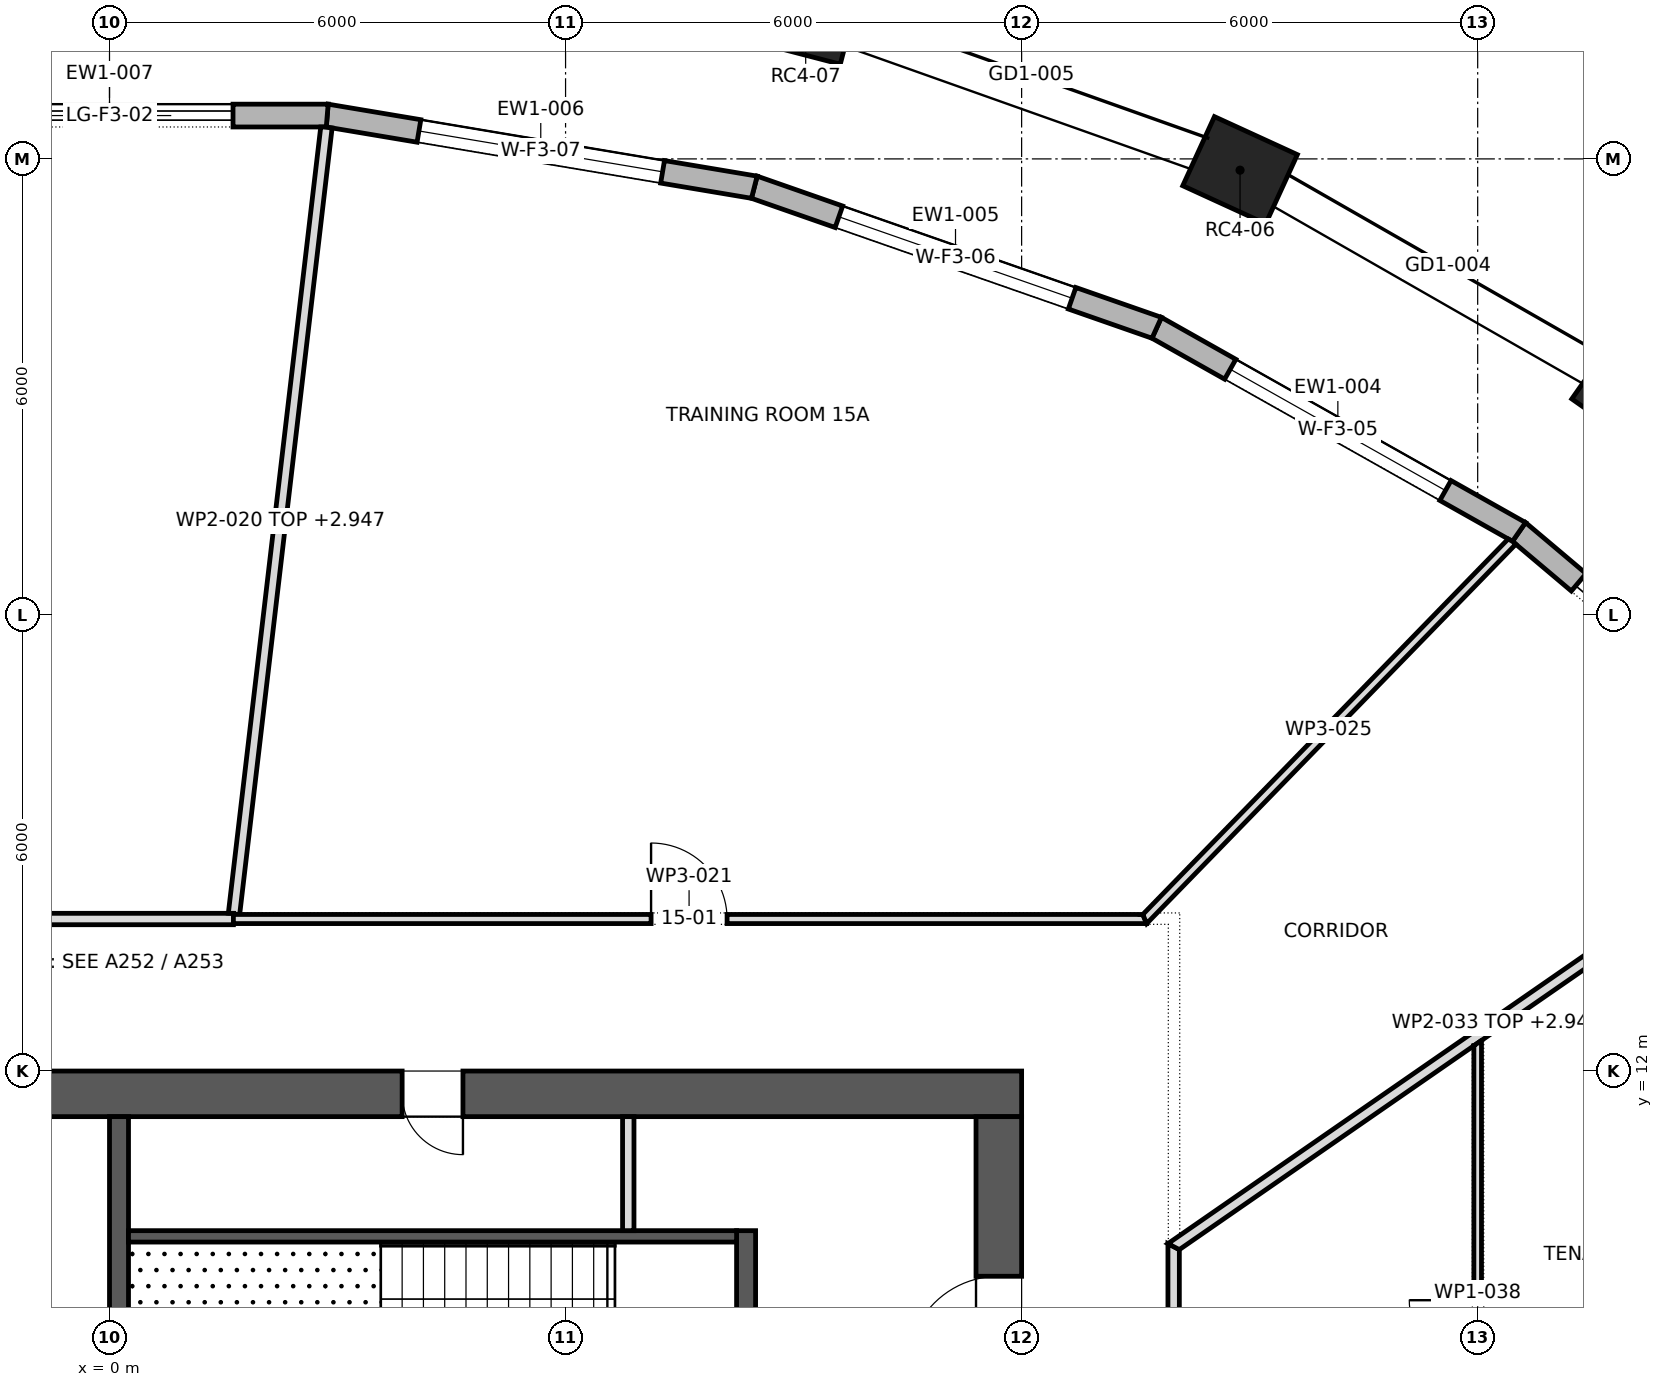
"""IFC4 building model, lengths in metres.
Left out: names, types, materials, properties, quantities, classifications, styles, units other than length and angle.
Written with IfcOpenShell. Run it as: python <this file> out.ifc"""

import sys

from ifc_helpers import new_model, si_unit, direction, frame, frame_2d, origin, origin_2d, place, context, subcontext, project, spatial, polyline, rectangle, outline, extrude, element, fill, save


model = new_model("IFC4")
c1 = context("Model", 3, precision=1e-05, world=origin(), true_north=direction((0.0, 1.0)))
c2 = subcontext(c1, "Body", "Model", "MODEL_VIEW")
j1 = project(units=[si_unit("LENGTHUNIT", "METRE"), si_unit("PLANEANGLEUNIT", "RADIAN")], contexts=[c1])
p1 = place(None, origin())
s1 = spatial("IfcSite", under=j1, at=p1, CompositionType="ELEMENT")
p2 = place(p1, origin())
s2 = spatial("IfcBuilding", under=s1, at=p2, CompositionType="ELEMENT")
p3 = place(p2, frame((0.0, 0.0, 222.9)))
s3 = spatial("IfcBuildingStorey", under=s2, at=p3, CompositionType="ELEMENT", Elevation=222.9)
for number, where, z_axis, x_axis in (
    (1, (20.017, 20.906, 0.0), (0.0, 0.0, 1.0), (-0.818, 0.575, 0.0)),
    (2, (14.874, 23.852, 0.0), (0.0, 0.0, 1.0), (-0.909, 0.417, 0.0)),
    (3, (9.159, 25.881, 0.0), (0.0, 0.0, 1.0), (-0.968, 0.252, 0.0)),
):
    element("IfcColumn", number, at=place(p3, frame(where, z_axis=z_axis, x_axis=x_axis)), inside=s3, PredefinedType="COLUMN", context=c2, shape_type="SweptSolid", body=[
        extrude(rectangle(XDim=1.2, YDim=1.0, at=origin_2d()), origin(), (0.0, 0.0, 1.0), 4.0),
    ])
p4 = place(p3, frame((-12.0, 11.7, 0.0), z_axis=(0.0, 0.0, 1.0), x_axis=(1.0, 0.0, 0.0)))
e4 = element("IfcWall", 4, at=p4, inside=s3, PredefinedType="SHEAR", context=c2, shape_type="SweptSolid", body=[
    extrude(rectangle(XDim=24.0, YDim=0.6, at=frame_2d((12.0, 0.0))), origin(), (0.0, 0.0, 1.0), 4.0),
])
p5 = place(p4, frame((9.975, 0.0, 0.0)))
e5 = element("IfcOpeningElement", 5, at=p5, cuts=e4, PredefinedType="OPENING", context=c2, shape_type="SweptSolid", body=[
    extrude(rectangle(XDim=0.9, YDim=2.1, at=frame_2d((0.45, 1.05))), frame((0.0, 0.312, 0.0), z_axis=(0.0, -1.0, 0.0), x_axis=(1.0, 0.0, 0.0)), (0.0, 0.0, 1.0), 0.624),
])
p6 = place(p4, frame((3.6, 0.0, 0.0)))
e6 = element("IfcOpeningElement", 6, at=p6, cuts=e4, PredefinedType="OPENING", context=c2, shape_type="SweptSolid", body=[
    extrude(rectangle(XDim=0.8, YDim=2.1, at=frame_2d((0.4, 1.05))), frame((0.0, 0.312, 0.0), z_axis=(0.0, -1.0, 0.0), x_axis=(1.0, 0.0, 0.0)), (0.0, 0.0, 1.0), 0.624),
])
p7 = place(p4, frame((6.2, 0.0, 0.0)))
e7 = element("IfcOpeningElement", 7, at=p7, cuts=e4, PredefinedType="OPENING", context=c2, shape_type="SweptSolid", body=[
    extrude(rectangle(XDim=0.8, YDim=2.1, at=frame_2d((0.4, 1.05))), frame((0.0, 0.312, 0.0), z_axis=(0.0, -1.0, 0.0), x_axis=(1.0, 0.0, 0.0)), (0.0, 0.0, 1.0), 0.624),
])
p8 = place(p4, frame((15.85, 0.0, 0.0)))
e8 = element("IfcOpeningElement", 8, at=p8, cuts=e4, PredefinedType="OPENING", context=c2, shape_type="SweptSolid", body=[
    extrude(rectangle(XDim=0.8, YDim=2.1, at=frame_2d((0.4, 1.05))), frame((0.0, 0.312, 0.0), z_axis=(0.0, -1.0, 0.0), x_axis=(1.0, 0.0, 0.0)), (0.0, 0.0, 1.0), 0.624),
])
p9 = place(p3, frame((11.7, -11.4, 0.0), z_axis=(0.0, 0.0, 1.0), x_axis=(0.0, 1.0, 0.0)))
e9 = element("IfcWall", 9, at=p9, inside=s3, PredefinedType="SHEAR", context=c2, shape_type="SweptSolid", body=[
    extrude(rectangle(XDim=22.8, YDim=0.6, at=frame_2d((11.4, 0.0))), origin(), (0.0, 0.0, 1.0), 4.0),
])
p10 = place(p9, frame((10.2, 0.0, 0.0)))
e10 = element("IfcOpeningElement", 10, at=p10, cuts=e9, PredefinedType="OPENING", context=c2, shape_type="SweptSolid", body=[
    extrude(rectangle(XDim=2.4, YDim=2.1, at=frame_2d((1.2, 1.05))), frame((0.0, 0.312, 0.0), z_axis=(0.0, -1.0, 0.0), x_axis=(1.0, 0.0, 0.0)), (0.0, 0.0, 1.0), 0.624),
])
p11 = place(p9, frame((19.5, 0.0, 0.0)))
e11 = element("IfcOpeningElement", 11, at=p11, cuts=e9, PredefinedType="OPENING", context=c2, shape_type="SweptSolid", body=[
    extrude(rectangle(XDim=1.2, YDim=2.1, at=frame_2d((0.6, 1.05))), frame((0.0, 0.312, 0.0), z_axis=(0.0, -1.0, 0.0), x_axis=(1.0, 0.0, 0.0)), (0.0, 0.0, 1.0), 0.624),
])
p12 = place(p9, frame((2.1, 0.0, 0.0)))
e12 = element("IfcOpeningElement", 12, at=p12, cuts=e9, PredefinedType="OPENING", context=c2, shape_type="SweptSolid", body=[
    extrude(rectangle(XDim=1.2, YDim=2.1, at=frame_2d((0.6, 1.05))), frame((0.0, 0.312, 0.0), z_axis=(0.0, -1.0, 0.0), x_axis=(1.0, 0.0, 0.0)), (0.0, 0.0, 1.0), 0.624),
])
p13 = place(p3, frame((22.599, 15.672, 0.0), z_axis=(0.0, 0.0, 1.0), x_axis=(-0.764397795062, 0.644744919255, 0.0)))
e13 = element("IfcWall", 13, at=p13, inside=s3, PredefinedType="STANDARD", context=c2, shape_type="SweptSolid", body=[
    extrude(outline(polyline([(-0.015, -0.15), (5.319, -0.15), (5.291, 0.15), (0.015, 0.15), (-0.015, -0.15)])), origin(), (0.0, 0.0, 1.0), 3.7),
])
p14 = place(p13, frame((1.028, 0.0, 0.0)))
e14 = element("IfcOpeningElement", 14, at=p14, cuts=e13, PredefinedType="OPENING", context=c2, shape_type="SweptSolid", body=[
    extrude(rectangle(XDim=3.25, YDim=3.25, at=frame_2d((1.625, 1.625))), frame((0.0, 0.162, 0.0), z_axis=(0.0, -1.0, 0.0), x_axis=(1.0, 0.0, 0.0)), (0.0, 0.0, 1.0), 0.324),
])
p15 = place(p3, frame((18.543, 19.092, 0.0), z_axis=(0.0, 0.0, 1.0), x_axis=(-0.871207038577, 0.490915772749, 0.0)))
e15 = element("IfcWall", 15, at=p15, inside=s3, PredefinedType="STANDARD", context=c2, shape_type="SweptSolid", body=[
    extrude(outline(polyline([(-0.014, -0.15), (5.484, -0.15), (5.458, 0.15), (0.014, 0.15), (-0.014, -0.15)])), origin(), (0.0, 0.0, 1.0), 3.7),
])
p16 = place(p15, frame((1.111, 0.0, 0.6)))
e16 = element("IfcOpeningElement", 16, at=p16, cuts=e15, PredefinedType="OPENING", context=c2, shape_type="SweptSolid", body=[
    extrude(rectangle(XDim=3.25, YDim=2.65, at=frame_2d((1.625, 1.325))), frame((0.0, 0.162, 0.0), z_axis=(0.0, -1.0, 0.0), x_axis=(1.0, 0.0, 0.0)), (0.0, 0.0, 1.0), 0.324),
])
p17 = place(p3, frame((13.777, 21.778, 0.0), z_axis=(0.0, 0.0, 1.0), x_axis=(-0.944053670735, 0.329791853708, 0.0)))
e17 = element("IfcWall", 17, at=p17, inside=s3, PredefinedType="STANDARD", context=c2, shape_type="SweptSolid", body=[
    extrude(outline(polyline([(-0.013, -0.15), (5.62, -0.15), (5.595, 0.15), (0.013, 0.15), (-0.013, -0.15)])), origin(), (0.0, 0.0, 1.0), 3.7),
])
p18 = place(p17, frame((1.179, 0.0, 0.6)))
e18 = element("IfcOpeningElement", 18, at=p18, cuts=e17, PredefinedType="OPENING", context=c2, shape_type="SweptSolid", body=[
    extrude(rectangle(XDim=3.25, YDim=2.65, at=frame_2d((1.625, 1.325))), frame((0.0, 0.162, 0.0), z_axis=(0.0, -1.0, 0.0), x_axis=(1.0, 0.0, 0.0)), (0.0, 0.0, 1.0), 0.324),
])
p19 = place(p3, frame((8.483, 23.627, 0.0), z_axis=(0.0, 0.0, 1.0), x_axis=(-0.986218486863, 0.16544816762, 0.0)))
e19 = element("IfcWall", 19, at=p19, inside=s3, PredefinedType="STANDARD", context=c2, shape_type="SweptSolid", body=[
    extrude(outline(polyline([(-0.013, -0.15), (5.71, -0.15), (5.685, 0.15), (0.013, 0.15), (-0.013, -0.15)])), origin(), (0.0, 0.0, 1.0), 3.7),
])
p20 = place(p19, frame((1.224, 0.0, 0.6)))
e20 = element("IfcOpeningElement", 20, at=p20, cuts=e19, PredefinedType="OPENING", context=c2, shape_type="SweptSolid", body=[
    extrude(rectangle(XDim=3.25, YDim=2.65, at=frame_2d((1.625, 1.325))), frame((0.0, 0.162, 0.0), z_axis=(0.0, -1.0, 0.0), x_axis=(1.0, 0.0, 0.0)), (0.0, 0.0, 1.0), 0.324),
])
p21 = place(p3, frame((2.864, 24.57, 0.0), z_axis=(0.0, 0.0, 1.0), x_axis=(-1.0, 0.0, 0.0)))
e21 = element("IfcWall", 21, at=p21, inside=s3, PredefinedType="STANDARD", context=c2, shape_type="SweptSolid", body=[
    extrude(outline(polyline([(-0.012, -0.15), (5.741, -0.15), (5.716, 0.15), (0.012, 0.15), (-0.012, -0.15)])), origin(), (0.0, 0.0, 1.0), 3.7),
])
p22 = place(p21, frame((1.239, 0.0, 0.0)))
e22 = element("IfcOpeningElement", 22, at=p22, cuts=e21, PredefinedType="OPENING", context=c2, shape_type="SweptSolid", body=[
    extrude(rectangle(XDim=3.25, YDim=3.25, at=frame_2d((1.625, 1.625))), frame((0.0, 0.162, 0.0), z_axis=(0.0, -1.0, 0.0), x_axis=(1.0, 0.0, 0.0)), (0.0, 0.0, 1.0), 0.324),
])
p23 = place(p3, frame((0.125, 6.5, 0.0), z_axis=(0.0, 0.0, 1.0), x_axis=(0.0, 1.0, 0.0)))
e23 = element("IfcWall", 23, at=p23, inside=s3, PredefinedType="SHEAR", context=c2, shape_type="SweptSolid", body=[
    extrude(rectangle(XDim=4.9, YDim=0.25, at=frame_2d((2.45, 0.0))), origin(), (0.0, 0.0, 1.0), 3.7),
])
p24 = place(p3, frame((8.375, 6.5, 0.0), z_axis=(0.0, 0.0, 1.0), x_axis=(0.0, 1.0, 0.0)))
e24 = element("IfcWall", 24, at=p24, inside=s3, PredefinedType="SHEAR", context=c2, shape_type="SweptSolid", body=[
    extrude(rectangle(XDim=3.4, YDim=0.25, at=frame_2d((1.7, 0.0))), origin(), (0.0, 0.0, 1.0), 3.7),
])
p25 = place(p24, frame((1.025, 0.0, 0.0)))
e25 = element("IfcOpeningElement", 25, at=p25, cuts=e24, PredefinedType="OPENING", context=c2, shape_type="SweptSolid", body=[
    extrude(rectangle(XDim=1.2, YDim=2.1, at=frame_2d((0.6, 1.05))), frame((0.0, 0.137, 0.0), z_axis=(0.0, -1.0, 0.0), x_axis=(1.0, 0.0, 0.0)), (0.0, 0.0, 1.0), 0.274),
])
p26 = place(p3, frame((0.25, 9.825, 0.0), z_axis=(0.0, 0.0, 1.0), x_axis=(1.0, 0.0, 0.0)))
e26 = element("IfcWall", 26, at=p26, inside=s3, PredefinedType="SHEAR", context=c2, shape_type="SweptSolid", body=[
    extrude(rectangle(XDim=8.0, YDim=0.15, at=frame_2d((4.0, 0.0))), origin(), (0.0, 0.0, 1.0), 3.7),
])
p27 = place(p3, frame((6.825, 9.9, 0.0), z_axis=(0.0, 0.0, 1.0), x_axis=(0.0, 1.0, 0.0)))
e27 = element("IfcWall", 27, at=p27, inside=s3, PredefinedType="PARTITIONING", context=c2, shape_type="SweptSolid", body=[
    extrude(rectangle(XDim=1.5, YDim=0.15, at=frame_2d((0.75, 0.0))), origin(), (0.0, 0.0, 1.0), 3.7),
])
p28 = place(p3, frame((-14.075, 14.0, 0.0), z_axis=(0.0, 0.0, 1.0), x_axis=(1.0, 0.0, 0.0)))
e28 = element("IfcWall", 28, at=p28, inside=s3, PredefinedType="PARTITIONING", context=c2, shape_type="SweptSolid", body=[
    extrude(outline(polyline([(15.705, 0.075), (13.742, 0.075), (11.779, 0.075), (9.815, 0.075), (7.853, 0.075), (5.889, 0.075), (3.926, 0.075), (1.963, 0.075), (0.0, 0.075), (0.15, -0.075), (2.094, -0.075), (4.039, -0.075), (5.983, -0.075), (7.927, -0.075), (9.872, -0.075), (11.816, -0.075), (13.76, -0.075), (15.705, -0.075), (15.705, 0.075)])), origin(), (0.0, 0.0, 1.0), 3.7),
])
p29 = place(p28, frame((9.955, 0.0, 0.0)))
e29 = element("IfcOpeningElement", 29, at=p29, cuts=e28, PredefinedType="OPENING", context=c2, shape_type="SweptSolid", body=[
    extrude(rectangle(XDim=1.0, YDim=2.1, at=frame_2d((0.5, 1.05))), frame((0.0, 0.087, 0.0), z_axis=(0.0, -1.0, 0.0), x_axis=(1.0, 0.0, 0.0)), (0.0, 0.0, 1.0), 0.174),
])
p30 = place(p28, frame((2.14, 0.0, 0.0)))
e30 = element("IfcOpeningElement", 30, at=p30, cuts=e28, PredefinedType="OPENING", context=c2, shape_type="SweptSolid", body=[
    extrude(rectangle(XDim=1.0, YDim=2.1, at=frame_2d((0.5, 1.05))), frame((0.0, 0.087, 0.0), z_axis=(0.0, -1.0, 0.0), x_axis=(1.0, 0.0, 0.0)), (0.0, 0.0, 1.0), 0.174),
])
p31 = place(p3, frame((1.638, 14.066, 0.0), z_axis=(0.0, 0.0, 1.0), x_axis=(0.116747450487, 0.993161634783, 0.0)))
e31 = element("IfcWall", 31, at=p31, inside=s3, PredefinedType="PARTITIONING", context=c2, shape_type="SweptSolid", body=[
    extrude(outline(polyline([(10.42, -0.075), (10.42, 0.039), (10.416, 0.075), (8.68, 0.075), (6.944, 0.075), (5.208, 0.075), (3.472, 0.075), (1.736, 0.075), (0.0, 0.075), (0.0, 0.074), (0.008, 0.009), (0.0, 0.008), (0.0, -0.055), (0.002, -0.075), (1.739, -0.075), (3.475, -0.075), (5.211, -0.075), (6.948, -0.075), (8.684, -0.075), (10.42, -0.075)])), origin(), (0.0, 0.0, 1.0), 2.947),
])
p32 = place(p3, frame((1.63, 14.0, 0.0), z_axis=(0.0, 0.0, 1.0), x_axis=(1.0, 0.0, 0.0)))
e32 = element("IfcWall", 32, at=p32, inside=s3, PredefinedType="PARTITIONING", context=c2, shape_type="SweptSolid", body=[
    extrude(outline(polyline([(12.015, -0.06), (12.015, -0.06), (11.965, 0.06), (9.971, 0.06), (7.977, 0.06), (5.982, 0.06), (3.988, 0.06), (1.994, 0.06), (0.0, 0.06), (0.0, -0.06), (1.717, -0.06), (3.433, -0.06), (5.149, -0.06), (6.866, -0.06), (8.583, -0.06), (10.299, -0.06), (12.015, -0.06)])), origin(), (0.0, 0.0, 1.0), 3.7),
])
p33 = place(p32, frame((5.495, 0.0, 0.0)))
e33 = element("IfcOpeningElement", 33, at=p33, cuts=e32, PredefinedType="OPENING", context=c2, shape_type="SweptSolid", body=[
    extrude(rectangle(XDim=1.0, YDim=2.1, at=frame_2d((0.5, 1.05))), frame((0.0, 0.072, 0.0), z_axis=(0.0, -1.0, 0.0), x_axis=(1.0, 0.0, 0.0)), (0.0, 0.0, 1.0), 0.144),
])
p34 = place(p3, frame((13.602, 13.982, 0.0), z_axis=(0.0, 0.0, 1.0), x_axis=(0.697346685185, 0.716733981797, 0.0)))
e34 = element("IfcWall", 34, at=p34, inside=s3, PredefinedType="PARTITIONING", context=c2, shape_type="SweptSolid", body=[
    extrude(outline(polyline([(6.964, -0.06), (6.964, -0.058), (6.96, -0.002), (6.943, 0.06), (5.22, 0.06), (3.497, 0.06), (1.774, 0.06), (0.051, 0.06), (0.051, 0.06), (0.025, 0.0), (0.0, -0.06), (1.741, -0.06), (3.482, -0.06), (5.223, -0.06), (6.964, -0.06)])), origin(), (0.0, 0.0, 1.0), 3.7),
])
p35 = place(p3, frame((14.0, -0.26, 0.0), z_axis=(0.0, 0.0, 1.0), x_axis=(0.0, 1.0, 0.0)))
e35 = element("IfcWall", 35, at=p35, inside=s3, PredefinedType="PARTITIONING", context=c2, shape_type="SweptSolid", body=[
    extrude(outline(polyline([(0.0, -0.075), (1.982, -0.075), (3.964, -0.075), (5.947, -0.075), (7.929, -0.075), (9.911, -0.075), (9.989, 0.075), (9.989, 0.075), (7.991, 0.075), (5.994, 0.075), (3.996, 0.075), (1.998, 0.075), (0.0, 0.075), (0.0, -0.075)])), origin(), (0.0, 0.0, 1.0), 3.7),
])
p36 = place(p35, frame((1.42, 0.0, 0.0)))
e36 = element("IfcOpeningElement", 36, at=p36, cuts=e35, PredefinedType="OPENING", context=c2, shape_type="SweptSolid", body=[
    extrude(rectangle(XDim=1.0, YDim=2.1, at=frame_2d((0.5, 1.05))), frame((0.0, 0.087, 0.0), z_axis=(0.0, -1.0, 0.0), x_axis=(1.0, 0.0, 0.0)), (0.0, 0.0, 1.0), 0.174),
])
p37 = place(p35, frame((6.395, 0.0, 0.0)))
e37 = element("IfcOpeningElement", 37, at=p37, cuts=e35, PredefinedType="OPENING", context=c2, shape_type="SweptSolid", body=[
    extrude(rectangle(XDim=1.0, YDim=2.1, at=frame_2d((0.5, 1.05))), frame((0.0, 0.087, 0.0), z_axis=(0.0, -1.0, 0.0), x_axis=(1.0, 0.0, 0.0)), (0.0, 0.0, 1.0), 0.174),
])
p38 = place(p3, frame((13.968, 9.667, 0.0), z_axis=(0.0, 0.0, 1.0), x_axis=(0.822219313141, 0.56917080134, 0.0)))
e38 = element("IfcWall", 38, at=p38, inside=s3, PredefinedType="PARTITIONING", context=c2, shape_type="SweptSolid", body=[
    extrude(outline(polyline([(0.079, -0.075), (1.65, -0.075), (3.22, -0.075), (4.791, -0.075), (4.792, -0.073), (4.795, -0.075), (6.653, -0.075), (8.511, -0.075), (10.37, -0.075), (10.37, -0.066), (10.365, -0.0), (10.345, 0.075), (8.621, 0.075), (6.897, 0.075), (5.173, 0.075), (3.448, 0.075), (1.724, 0.075), (0.0, 0.075), (0.039, 0.0), (0.079, -0.075)])), origin(), (0.0, 0.0, 1.0), 2.947),
])
p39 = place(p3, frame((18.0, 12.402, 0.0), z_axis=(0.0, 0.0, 1.0), x_axis=(0.0, -1.0, 0.0)))
e39 = element("IfcWall", 39, at=p39, inside=s3, PredefinedType="PARTITIONING", context=c2, shape_type="SweptSolid", body=[
    extrude(outline(polyline([(7.727, -0.05), (7.727, -0.048), (7.702, 0.05), (5.776, 0.05), (3.851, 0.05), (1.926, 0.05), (0.0, 0.05), (0.0, 0.05), (0.069, -0.05), (1.984, -0.05), (3.898, -0.05), (5.812, -0.05), (7.727, -0.05)])), origin(), (0.0, 0.0, 1.0), 3.7),
])
p40 = place(p39, frame((3.417, 0.0, 0.0)))
e40 = element("IfcOpeningElement", 40, at=p40, cuts=e39, PredefinedType="OPENING", context=c2, shape_type="SweptSolid", body=[
    extrude(rectangle(XDim=0.9, YDim=2.1, at=frame_2d((0.45, 1.05))), frame((0.0, 0.062, 0.0), z_axis=(0.0, -1.0, 0.0), x_axis=(1.0, 0.0, 0.0)), (0.0, 0.0, 1.0), 0.124),
])
p41 = place(p14, origin())
e41 = element("IfcDoor", 41, at=p41, inside=s3, OperationType="DOUBLE_DOOR_SLIDING", PredefinedType="DOOR", context=c2, shape_type="SweptSolid", body=[
    extrude(rectangle(XDim=3.25, YDim=3.25, at=frame_2d((1.625, 1.625))), frame((0.0, 0.025, 0.0), z_axis=(0.0, -1.0, 0.0), x_axis=(1.0, 0.0, 0.0)), (0.0, 0.0, 1.0), 0.05),
])
fill(e14, e41)
p42 = place(p16, origin())
e42 = element("IfcWindow", 42, at=p42, inside=s3, PartitioningType="TRIPLE_PANEL_VERTICAL", PredefinedType="WINDOW", context=c2, shape_type="SweptSolid", body=[
    extrude(rectangle(XDim=3.25, YDim=2.65, at=frame_2d((1.625, 1.325))), frame((0.0, 0.03, 0.0), z_axis=(0.0, -1.0, 0.0), x_axis=(1.0, 0.0, 0.0)), (0.0, 0.0, 1.0), 0.06),
])
fill(e16, e42)
p43 = place(p18, origin())
e43 = element("IfcWindow", 43, at=p43, inside=s3, PartitioningType="TRIPLE_PANEL_VERTICAL", PredefinedType="WINDOW", context=c2, shape_type="SweptSolid", body=[
    extrude(rectangle(XDim=3.25, YDim=2.65, at=frame_2d((1.625, 1.325))), frame((0.0, 0.03, 0.0), z_axis=(0.0, -1.0, 0.0), x_axis=(1.0, 0.0, 0.0)), (0.0, 0.0, 1.0), 0.06),
])
fill(e18, e43)
p44 = place(p20, origin())
e44 = element("IfcWindow", 44, at=p44, inside=s3, PartitioningType="TRIPLE_PANEL_VERTICAL", PredefinedType="WINDOW", context=c2, shape_type="SweptSolid", body=[
    extrude(rectangle(XDim=3.25, YDim=2.65, at=frame_2d((1.625, 1.325))), frame((0.0, 0.03, 0.0), z_axis=(0.0, -1.0, 0.0), x_axis=(1.0, 0.0, 0.0)), (0.0, 0.0, 1.0), 0.06),
])
fill(e20, e44)
p45 = place(p22, origin())
e45 = element("IfcDoor", 45, at=p45, inside=s3, OperationType="DOUBLE_DOOR_SLIDING", PredefinedType="DOOR", context=c2, shape_type="SweptSolid", body=[
    extrude(rectangle(XDim=3.25, YDim=3.25, at=frame_2d((1.625, 1.625))), frame((0.0, 0.025, 0.0), z_axis=(0.0, -1.0, 0.0), x_axis=(1.0, 0.0, 0.0)), (0.0, 0.0, 1.0), 0.05),
])
fill(e22, e45)
p46 = place(p11, origin())
e46 = element("IfcDoor", 46, at=p46, inside=s3, OperationType="SINGLE_SWING_RIGHT", PredefinedType="DOOR", context=c2, shape_type="SweptSolid", body=[
    extrude(rectangle(XDim=1.2, YDim=2.1, at=frame_2d((0.6, 1.05))), frame((0.0, 0.025, 0.0), z_axis=(0.0, -1.0, 0.0), x_axis=(1.0, 0.0, 0.0)), (0.0, 0.0, 1.0), 0.05),
])
fill(e11, e46)
p47 = place(p8, frame((0.8, 0.0, 0.0), z_axis=(0.0, 0.0, 1.0), x_axis=(-1.0, 0.0, 0.0)))
e47 = element("IfcDoor", 47, at=p47, inside=s3, OperationType="SINGLE_SWING_RIGHT", PredefinedType="DOOR", context=c2, shape_type="SweptSolid", body=[
    extrude(rectangle(XDim=0.8, YDim=2.1, at=frame_2d((0.4, 1.05))), frame((0.0, 0.025, 0.0), z_axis=(0.0, -1.0, 0.0), x_axis=(1.0, 0.0, 0.0)), (0.0, 0.0, 1.0), 0.05),
])
fill(e8, e47)
p48 = place(p33, origin())
e48 = element("IfcDoor", 48, at=p48, inside=s3, OperationType="SINGLE_SWING_RIGHT", PredefinedType="DOOR", context=c2, shape_type="SweptSolid", body=[
    extrude(rectangle(XDim=1.0, YDim=2.1, at=frame_2d((0.5, 1.05))), frame((0.0, 0.025, 0.0), z_axis=(0.0, -1.0, 0.0), x_axis=(1.0, 0.0, 0.0)), (0.0, 0.0, 1.0), 0.05),
])
fill(e33, e48)
p49 = place(p40, frame((0.9, 0.0, 0.0), z_axis=(0.0, 0.0, 1.0), x_axis=(-1.0, 0.0, 0.0)))
e49 = element("IfcDoor", 49, at=p49, inside=s3, OperationType="SINGLE_SWING_LEFT", PredefinedType="DOOR", context=c2, shape_type="SweptSolid", body=[
    extrude(rectangle(XDim=0.9, YDim=2.1, at=frame_2d((0.45, 1.05))), frame((0.0, 0.025, 0.0), z_axis=(0.0, -1.0, 0.0), x_axis=(1.0, 0.0, 0.0)), (0.0, 0.0, 1.0), 0.05),
])
fill(e40, e49)
save(model, sys.argv[1])
